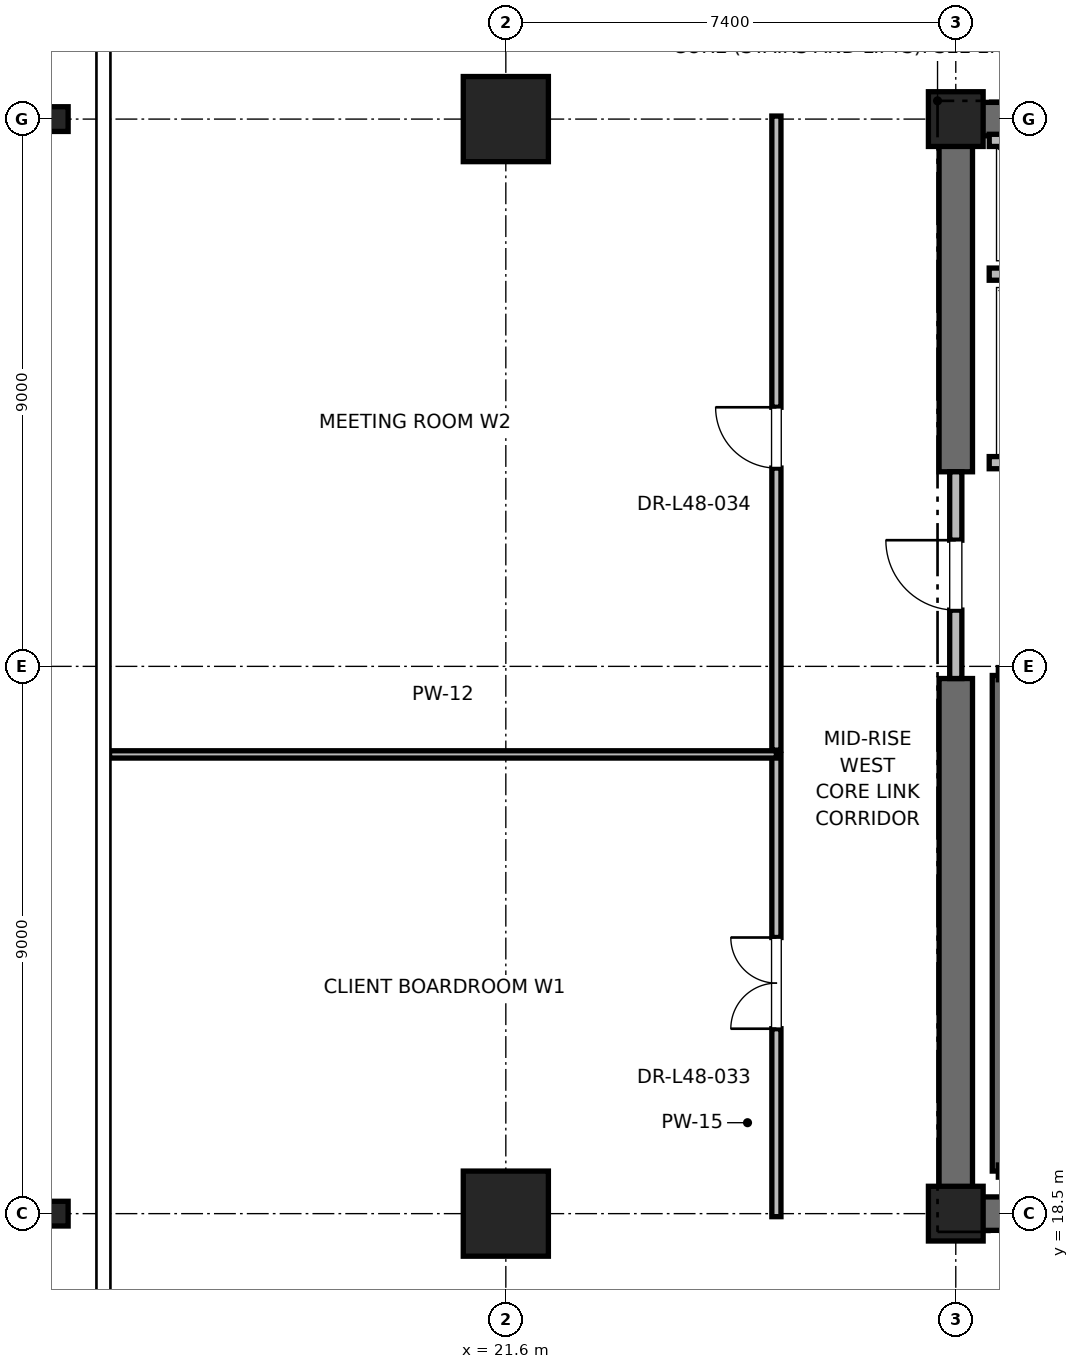
"""IFC4 building model, lengths in metres.
Left out: names, types, materials, properties, quantities, classifications, styles, units other than length and angle.
Written with IfcOpenShell. Run it as: python <this file> out.ifc"""

import sys

from ifc_helpers import new_model, si_unit, direction, frame, frame_2d, origin, origin_2d, place, context, subcontext, project, spatial, rectangle, i_section, extrude, element, fill, save


model = new_model("IFC4")
c1 = context("Model", 3, precision=1e-05, world=origin(), true_north=direction((0.0, 1.0)))
c2 = subcontext(c1, "Body", "Model", "MODEL_VIEW")
j1 = project(units=[si_unit("LENGTHUNIT", "METRE"), si_unit("PLANEANGLEUNIT", "RADIAN")], contexts=[c1])
p1 = place(None, origin())
s1 = spatial("IfcSite", under=j1, at=p1, CompositionType="ELEMENT")
p2 = place(p1, origin())
s2 = spatial("IfcBuilding", under=s1, at=p2, CompositionType="ELEMENT")
p3 = place(p2, frame((0.0, 0.0, 209.2)))
s3 = spatial("IfcBuildingStorey", under=s2, at=p3, CompositionType="ELEMENT", Elevation=209.2)
for number, where, z_axis, x_axis in (
    (1, (21.6, 18.5, 0.0), (0.0, 0.0, 1.0), (1.0, 0.0, 0.0)),
    (2, (21.6, 36.5, 0.0), (0.0, 0.0, 1.0), (1.0, 0.0, 0.0)),
):
    element("IfcColumn", number, at=place(p3, frame(where, z_axis=z_axis, x_axis=x_axis)), inside=s3, PredefinedType="COLUMN", context=c2, shape_type="SweptSolid", body=[
        extrude(rectangle(XDim=1.4, YDim=1.4, at=origin_2d()), origin(), (0.0, 0.0, 1.0), 4.0),
    ])
for number, where, z_axis, x_axis in (
    (3, (14.2, 18.5, 0.0), (0.0, 0.0, 1.0), (1.0, 0.0, 0.0)),
    (4, (14.2, 36.5, 0.0), (0.0, 0.0, 1.0), (1.0, 0.0, 0.0)),
):
    element("IfcColumn", number, at=place(p3, frame(where, z_axis=z_axis, x_axis=x_axis)), inside=s3, PredefinedType="COLUMN", context=c2, shape_type="SweptSolid", body=[
        extrude(i_section(OverallWidth=0.403, OverallDepth=0.406, WebThickness=0.027, FlangeThickness=0.043, FilletRadius=0.015, at=origin_2d()), origin(), (0.0, 0.0, 1.0), 4.0),
    ])
for number, where, z_axis, x_axis in (
    (5, (29.0, 18.5, 0.0), (0.0, 0.0, 1.0), (1.0, 0.0, 0.0)),
    (6, (29.0, 36.5, 0.0), (0.0, 0.0, 1.0), (1.0, 0.0, 0.0)),
):
    element("IfcColumn", number, at=place(p3, frame(where, z_axis=z_axis, x_axis=x_axis)), inside=s3, PredefinedType="PILASTER", context=c2, shape_type="SweptSolid", body=[
        extrude(rectangle(XDim=0.9, YDim=0.9, at=origin_2d()), origin(), (0.0, 0.0, 1.0), 4.0),
    ])
p4 = place(p3, frame((29.0, 18.5, 0.0), z_axis=(0.0, 0.0, 1.0), x_axis=(1.0, 0.0, 0.0)))
e7 = element("IfcWall", 7, at=p4, inside=s3, PredefinedType="SHEAR", context=c2, shape_type="SweptSolid", body=[
    extrude(rectangle(XDim=9.2, YDim=0.55, at=frame_2d((4.6, 0.0))), origin(), (0.0, 0.0, 1.0), 3.775),
])
p5 = place(p3, frame((29.0, 36.5, 0.0), z_axis=(0.0, 0.0, 1.0), x_axis=(1.0, 0.0, 0.0)))
e8 = element("IfcWall", 8, at=p5, inside=s3, PredefinedType="SHEAR", context=c2, shape_type="SweptSolid", body=[
    extrude(rectangle(XDim=5.8, YDim=0.55, at=frame_2d((2.9, 0.0))), origin(), (0.0, 0.0, 1.0), 3.775),
])
p6 = place(p3, frame((29.0, 18.5, 0.0), z_axis=(0.0, 0.0, 1.0), x_axis=(0.0, 1.0, 0.0)))
e9 = element("IfcWall", 9, at=p6, inside=s3, PredefinedType="SHEAR", context=c2, shape_type="SweptSolid", body=[
    extrude(rectangle(XDim=8.8, YDim=0.55, at=frame_2d((4.4, 0.0))), origin(), (0.0, 0.0, 1.0), 3.775),
])
p7 = place(p3, frame((29.0, 30.7, 0.0), z_axis=(0.0, 0.0, 1.0), x_axis=(0.0, 1.0, 0.0)))
e10 = element("IfcWall", 10, at=p7, inside=s3, PredefinedType="SHEAR", context=c2, shape_type="SweptSolid", body=[
    extrude(rectangle(XDim=5.8, YDim=0.55, at=frame_2d((2.9, 0.0))), origin(), (0.0, 0.0, 1.0), 3.775),
])
p8 = place(p3, frame((29.7, 19.2, 0.0), z_axis=(0.0, 0.0, 1.0), x_axis=(0.0, 1.0, 0.0)))
e11 = element("IfcWall", 11, at=p8, inside=s3, PredefinedType="SOLIDWALL", context=c2, shape_type="SweptSolid", body=[
    extrude(rectangle(XDim=8.15, YDim=0.2, at=frame_2d((4.075, 0.0))), origin(), (0.0, 0.0, 1.0), 3.775),
])
p9 = place(p3, frame((29.0, 27.3, 0.0), z_axis=(0.0, 0.0, 1.0), x_axis=(0.0, 1.0, 0.0)))
e12 = element("IfcWall", 12, at=p9, inside=s3, PredefinedType="PARTITIONING", context=c2, shape_type="SweptSolid", body=[
    extrude(rectangle(XDim=3.4, YDim=0.2, at=frame_2d((1.7, 0.0))), origin(), (0.0, 0.0, 1.0), 2.755),
])
p10 = place(p9, frame((1.125, 0.0, 0.0)))
e13 = element("IfcOpeningElement", 13, at=p10, cuts=e12, PredefinedType="OPENING", context=c2, shape_type="SweptSolid", body=[
    extrude(rectangle(XDim=1.15, YDim=2.2, at=frame_2d((0.575, 1.1))), frame((0.0, 0.1, 0.0), z_axis=(0.0, -1.0, 0.0), x_axis=(1.0, 0.0, 0.0)), (0.0, 0.0, 1.0), 0.2),
])
p11 = place(p3, frame((29.55, 30.85, 0.0), z_axis=(0.0, 0.0, 1.0), x_axis=(1.0, 0.0, 0.0)))
e14 = element("IfcWall", 14, at=p11, inside=s3, PredefinedType="SOLIDWALL", context=c2, shape_type="SweptSolid", body=[
    extrude(rectangle(XDim=2.6, YDim=0.2, at=frame_2d((1.3, 0.0))), origin(), (0.0, 0.0, 1.0), 2.755),
])
p12 = place(p11, frame((0.75, 0.0, 0.0)))
e15 = element("IfcOpeningElement", 15, at=p12, cuts=e14, PredefinedType="OPENING", context=c2, shape_type="SweptSolid", body=[
    extrude(rectangle(XDim=1.1, YDim=2.2, at=frame_2d((0.55, 1.1))), frame((0.0, 0.1, 0.0), z_axis=(0.0, -1.0, 0.0), x_axis=(1.0, 0.0, 0.0)), (0.0, 0.0, 1.0), 0.2),
])
p13 = place(p3, frame((29.55, 33.95, 0.0), z_axis=(0.0, 0.0, 1.0), x_axis=(1.0, 0.0, 0.0)))
e16 = element("IfcWall", 16, at=p13, inside=s3, PredefinedType="SOLIDWALL", context=c2, shape_type="SweptSolid", body=[
    extrude(rectangle(XDim=2.8, YDim=0.2, at=frame_2d((1.4, 0.0))), origin(), (0.0, 0.0, 1.0), 3.775),
])
p14 = place(p3, frame((32.35, 36.15, 0.0), z_axis=(0.0, 0.0, 1.0), x_axis=(-1.0, 0.0, 0.0)))
e17 = element("IfcWall", 17, at=p14, inside=s3, PredefinedType="SOLIDWALL", context=c2, shape_type="SweptSolid", body=[
    extrude(rectangle(XDim=2.8, YDim=0.2, at=frame_2d((1.4, 0.0))), origin(), (0.0, 0.0, 1.0), 3.062),
])
p15 = place(p3, frame((26.05, 18.45, 0.0), z_axis=(0.0, 0.0, 1.0), x_axis=(0.0, 1.0, 0.0)))
e18 = element("IfcWall", 18, at=p15, inside=s3, PredefinedType="PARTITIONING", context=c2, shape_type="SweptSolid", body=[
    extrude(rectangle(XDim=7.602, YDim=0.15, at=frame_2d((3.801, 0.0))), origin(), (0.0, 0.0, 1.0), 2.85),
])
p16 = place(p15, frame((3.091, 0.0, 0.0)))
e19 = element("IfcOpeningElement", 19, at=p16, cuts=e18, PredefinedType="OPENING", context=c2, shape_type="SweptSolid", body=[
    extrude(rectangle(XDim=1.5, YDim=2.25, at=frame_2d((0.75, 1.125))), frame((0.0, 0.075, 0.0), z_axis=(0.0, -1.0, 0.0), x_axis=(1.0, 0.0, 0.0)), (0.0, 0.0, 1.0), 0.15),
])
p17 = place(p3, frame((15.082, 26.052, 0.0), z_axis=(0.0, 0.0, 1.0), x_axis=(1.0, 0.0, 0.0)))
e20 = element("IfcWall", 20, at=p17, inside=s3, PredefinedType="PARTITIONING", context=c2, shape_type="SweptSolid", body=[
    extrude(rectangle(XDim=10.968, YDim=0.12, at=frame_2d((5.484, 0.0))), origin(), (0.0, 0.0, 1.0), 2.85),
])
p18 = place(p3, frame((26.05, 26.122, 0.0), z_axis=(0.0, 0.0, 1.0), x_axis=(0.0, 1.0, 0.0)))
e21 = element("IfcWall", 21, at=p18, inside=s3, PredefinedType="PARTITIONING", context=c2, shape_type="SweptSolid", body=[
    extrude(rectangle(XDim=10.428, YDim=0.15, at=frame_2d((5.214, 0.0))), origin(), (0.0, 0.0, 1.0), 2.85),
])
p19 = place(p18, frame((4.639, 0.0, 0.0)))
e22 = element("IfcOpeningElement", 22, at=p19, cuts=e21, PredefinedType="OPENING", context=c2, shape_type="SweptSolid", body=[
    extrude(rectangle(XDim=1.0, YDim=2.15, at=frame_2d((0.5, 1.075))), frame((0.0, 0.075, 0.0), z_axis=(0.0, -1.0, 0.0), x_axis=(1.0, 0.0, 0.0)), (0.0, 0.0, 1.0), 0.15),
])
p20 = place(p10, origin())
e23 = element("IfcDoor", 23, at=p20, inside=s3, OperationType="SINGLE_SWING_RIGHT", PredefinedType="DOOR", context=c2, shape_type="SweptSolid", body=[
    extrude(rectangle(XDim=1.15, YDim=2.2, at=frame_2d((0.575, 1.1))), frame((0.0, 0.025, 0.0), z_axis=(0.0, -1.0, 0.0), x_axis=(1.0, 0.0, 0.0)), (0.0, 0.0, 1.0), 0.05),
])
fill(e13, e23)
p21 = place(p16, origin())
e24 = element("IfcDoor", 24, at=p21, inside=s3, OperationType="DOUBLE_DOOR_SINGLE_SWING", PredefinedType="DOOR", context=c2, shape_type="SweptSolid", body=[
    extrude(rectangle(XDim=1.5, YDim=2.25, at=frame_2d((0.75, 1.125))), frame((0.0, 0.025, 0.0), z_axis=(0.0, -1.0, 0.0), x_axis=(1.0, 0.0, 0.0)), (0.0, 0.0, 1.0), 0.05),
])
fill(e19, e24)
p22 = place(p19, origin())
e25 = element("IfcDoor", 25, at=p22, inside=s3, OperationType="SINGLE_SWING_RIGHT", PredefinedType="DOOR", context=c2, shape_type="SweptSolid", body=[
    extrude(rectangle(XDim=1.0, YDim=2.15, at=frame_2d((0.5, 1.075))), frame((0.0, 0.025, 0.0), z_axis=(0.0, -1.0, 0.0), x_axis=(1.0, 0.0, 0.0)), (0.0, 0.0, 1.0), 0.05),
])
fill(e22, e25)
save(model, sys.argv[1])
